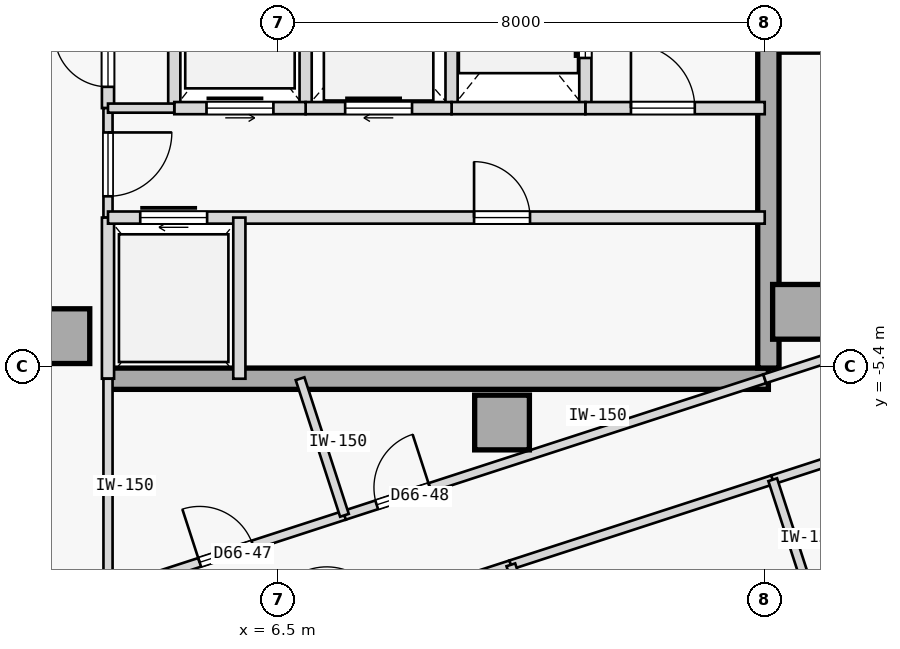
"""IFC4 building model, lengths in metres.
Left out: names, types, materials, properties, quantities, classifications, styles, units other than length and angle.
Written with IfcOpenShell. Run it as: python <this file> out.ifc"""

import sys

from ifc_helpers import new_model, si_unit, direction, frame, frame_2d, origin, origin_2d, place, context, subcontext, project, spatial, rectangle, extrude, element, fill, save


model = new_model("IFC4")
c1 = context("Model", 3, precision=1e-05, world=origin(), true_north=direction((0.0, 1.0)))
c2 = subcontext(c1, "Body", "Model", "MODEL_VIEW")
j1 = project(units=[si_unit("LENGTHUNIT", "METRE"), si_unit("PLANEANGLEUNIT", "RADIAN")], contexts=[c1])
p1 = place(None, origin())
s1 = spatial("IfcSite", under=j1, at=p1, CompositionType="ELEMENT")
p2 = place(p1, origin())
s2 = spatial("IfcBuilding", under=s1, at=p2, CompositionType="ELEMENT")
p3 = place(p2, frame((0.0, 0.0, 247.75)))
s3 = spatial("IfcBuildingStorey", under=s2, at=p3, CompositionType="ELEMENT", Elevation=247.75)
for number, where, z_axis, x_axis in (
    (1, (15.08, -4.5, 0.0), (0.0, 0.0, 1.0), (1.0, 0.0, 0.0)),
    (2, (10.18, -6.32, 0.0), (0.0, 0.0, 1.0), (1.0, 0.0, 0.0)),
    (3, (2.95, -4.9, 0.0), (0.0, 0.0, 1.0), (1.0, 0.0, 0.0)),
):
    element("IfcColumn", number, at=place(p3, frame(where, z_axis=z_axis, x_axis=x_axis)), inside=s3, PredefinedType="COLUMN", context=c2, shape_type="SweptSolid", body=[
        extrude(rectangle(XDim=0.9, YDim=0.9, at=origin_2d()), origin(), (0.0, 0.0, 1.0), 3.35),
    ])
p4 = place(p3, frame((3.7, -5.6, 0.0), z_axis=(0.0, 0.0, 1.0), x_axis=(1.0, 0.0, 0.0)))
e4 = element("IfcWall", 4, at=p4, inside=s3, PredefinedType="SHEAR", context=c2, shape_type="SweptSolid", body=[
    extrude(rectangle(XDim=10.86, YDim=0.35, at=frame_2d((5.43, 0.0))), origin(), (0.0, 0.0, 1.0), 3.125),
])
p5 = place(p3, frame((14.56, -5.425, 0.0), z_axis=(0.0, 0.0, 1.0), x_axis=(0.0, 1.0, 0.0)))
e5 = element("IfcWall", 5, at=p5, inside=s3, PredefinedType="SHEAR", context=c2, shape_type="SweptSolid", body=[
    extrude(rectangle(XDim=10.85, YDim=0.35, at=frame_2d((5.425, 0.0))), origin(), (0.0, 0.0, 1.0), 3.125),
])
p6 = place(p3, frame((3.7, -1.15, 0.0), z_axis=(0.0, 0.0, 1.0), x_axis=(0.0, 1.0, 0.0)))
e6 = element("IfcWall", 6, at=p6, inside=s3, PredefinedType="STANDARD", context=c2, shape_type="SweptSolid", body=[
    extrude(rectangle(XDim=6.75, YDim=0.2, at=frame_2d((3.375, 0.0))), origin(), (0.0, 0.0, 1.0), 3.125),
])
p7 = place(p6, frame((0.35, 0.0, 0.0)))
e7 = element("IfcOpeningElement", 7, at=p7, cuts=e6, PredefinedType="OPENING", context=c2, shape_type="SweptSolid", body=[
    extrude(rectangle(XDim=0.88, YDim=2.15, at=frame_2d((0.44, 1.075))), frame((0.0, 0.11, 0.0), z_axis=(0.0, -1.0, 0.0), x_axis=(1.0, 0.0, 0.0)), (0.0, 0.0, 1.0), 0.22),
])
p8 = place(p6, frame((2.55, 0.0, 0.0)))
e8 = element("IfcOpeningElement", 8, at=p8, cuts=e6, PredefinedType="OPENING", context=c2, shape_type="SweptSolid", body=[
    extrude(rectangle(XDim=0.92, YDim=2.15, at=frame_2d((0.46, 1.075))), frame((0.0, 0.11, 0.0), z_axis=(0.0, -1.0, 0.0), x_axis=(1.0, 0.0, 0.0)), (0.0, 0.0, 1.0), 0.22),
])
p9 = place(p6, frame((4.22, 0.0, 0.0)))
e9 = element("IfcOpeningElement", 9, at=p9, cuts=e6, PredefinedType="OPENING", context=c2, shape_type="SweptSolid", body=[
    extrude(rectangle(XDim=0.88, YDim=2.15, at=frame_2d((0.44, 1.075))), frame((0.0, 0.11, 0.0), z_axis=(0.0, -1.0, 0.0), x_axis=(1.0, 0.0, 0.0)), (0.0, 0.0, 1.0), 0.22),
])
p10 = place(p3, frame((3.7, -2.95, 0.0), z_axis=(0.0, 0.0, 1.0), x_axis=(0.0, 1.0, 0.0)))
e10 = element("IfcWall", 10, at=p10, inside=s3, PredefinedType="PARTITIONING", context=c2, shape_type="SweptSolid", body=[
    extrude(rectangle(XDim=1.8, YDim=0.15, at=frame_2d((0.9, 0.0))), origin(), (0.0, 0.0, 1.0), 3.125),
])
p11 = place(p10, frame((0.35, 0.0, 0.0)))
e11 = element("IfcOpeningElement", 11, at=p11, cuts=e10, PredefinedType="OPENING", context=c2, shape_type="SweptSolid", body=[
    extrude(rectangle(XDim=1.05, YDim=2.18, at=frame_2d((0.525, 1.09))), frame((0.0, 0.085, 0.0), z_axis=(0.0, -1.0, 0.0), x_axis=(1.0, 0.0, 0.0)), (0.0, 0.0, 1.0), 0.17),
])
p12 = place(p3, frame((3.7, -5.6, 0.0), z_axis=(0.0, 0.0, 1.0), x_axis=(0.0, 1.0, 0.0)))
e12 = element("IfcWall", 12, at=p12, inside=s3, PredefinedType="STANDARD", context=c2, shape_type="SweptSolid", body=[
    extrude(rectangle(XDim=2.65, YDim=0.2, at=frame_2d((1.325, 0.0))), origin(), (0.0, 0.0, 1.0), 3.125),
])
p13 = place(p3, frame((11.55, -1.15, 0.0), z_axis=(0.0, 0.0, 1.0), x_axis=(0.0, 1.0, 0.0)))
e13 = element("IfcWall", 13, at=p13, inside=s3, PredefinedType="STANDARD", context=c2, shape_type="SweptSolid", body=[
    extrude(rectangle(XDim=2.75, YDim=0.2, at=frame_2d((1.375, 0.0))), origin(), (0.0, 0.0, 1.0), 3.125),
])
p14 = place(p13, frame((0.825, 0.0, 0.0)))
e14 = element("IfcOpeningElement", 14, at=p14, cuts=e13, PredefinedType="OPENING", context=c2, shape_type="SweptSolid", body=[
    extrude(rectangle(XDim=1.1, YDim=2.15, at=frame_2d((0.55, 1.075))), frame((0.0, 0.11, 0.0), z_axis=(0.0, -1.0, 0.0), x_axis=(1.0, 0.0, 0.0)), (0.0, 0.0, 1.0), 0.22),
])
p15 = place(p3, frame((9.35, -1.15, 0.0), z_axis=(0.0, 0.0, 1.0), x_axis=(0.0, 1.0, 0.0)))
e15 = element("IfcWall", 15, at=p15, inside=s3, PredefinedType="STANDARD", context=c2, shape_type="SweptSolid", body=[
    extrude(rectangle(XDim=2.75, YDim=0.2, at=frame_2d((1.375, 0.0))), origin(), (0.0, 0.0, 1.0), 3.125),
])
p16 = place(p3, frame((11.55, -1.15, 0.0), z_axis=(0.0, 0.0, 1.0), x_axis=(1.0, 0.0, 0.0)))
e16 = element("IfcWall", 16, at=p16, inside=s3, PredefinedType="STANDARD", context=c2, shape_type="SweptSolid", body=[
    extrude(rectangle(XDim=2.95, YDim=0.2, at=frame_2d((1.475, 0.0))), origin(), (0.0, 0.0, 1.0), 3.125),
])
p17 = place(p16, frame((0.75, 0.0, 0.0)))
e17 = element("IfcOpeningElement", 17, at=p17, cuts=e16, PredefinedType="OPENING", context=c2, shape_type="SweptSolid", body=[
    extrude(rectangle(XDim=1.05, YDim=2.18, at=frame_2d((0.525, 1.09))), frame((0.0, 0.11, 0.0), z_axis=(0.0, -1.0, 0.0), x_axis=(1.0, 0.0, 0.0)), (0.0, 0.0, 1.0), 0.22),
])
p18 = place(p3, frame((9.35, -1.15, 0.0), z_axis=(0.0, 0.0, 1.0), x_axis=(1.0, 0.0, 0.0)))
e18 = element("IfcWall", 18, at=p18, inside=s3, PredefinedType="STANDARD", context=c2, shape_type="SweptSolid", body=[
    extrude(rectangle(XDim=2.2, YDim=0.2, at=frame_2d((1.1, 0.0))), origin(), (0.0, 0.0, 1.0), 3.125),
])
p19 = place(p3, frame((6.95, -1.15, 0.0), z_axis=(0.0, 0.0, 1.0), x_axis=(0.0, 1.0, 0.0)))
e19 = element("IfcWall", 19, at=p19, inside=s3, PredefinedType="STANDARD", context=c2, shape_type="SweptSolid", body=[
    extrude(rectangle(XDim=2.75, YDim=0.2, at=frame_2d((1.375, 0.0))), origin(), (0.0, 0.0, 1.0), 3.125),
])
p20 = place(p3, frame((6.95, -1.15, 0.0), z_axis=(0.0, 0.0, 1.0), x_axis=(1.0, 0.0, 0.0)))
e20 = element("IfcWall", 20, at=p20, inside=s3, PredefinedType="STANDARD", context=c2, shape_type="SweptSolid", body=[
    extrude(rectangle(XDim=2.4, YDim=0.2, at=frame_2d((1.2, 0.0))), origin(), (0.0, 0.0, 1.0), 3.125),
])
p21 = place(p20, frame((0.65, 0.0, 0.0)))
e21 = element("IfcOpeningElement", 21, at=p21, cuts=e20, PredefinedType="OPENING", context=c2, shape_type="SweptSolid", body=[
    extrude(rectangle(XDim=1.1, YDim=2.15, at=frame_2d((0.55, 1.075))), frame((0.0, 0.11, 0.0), z_axis=(0.0, -1.0, 0.0), x_axis=(1.0, 0.0, 0.0)), (0.0, 0.0, 1.0), 0.22),
])
p22 = place(p3, frame((4.79, -1.15, 0.0), z_axis=(0.0, 0.0, 1.0), x_axis=(0.0, 1.0, 0.0)))
e22 = element("IfcWall", 22, at=p22, inside=s3, PredefinedType="STANDARD", context=c2, shape_type="SweptSolid", body=[
    extrude(rectangle(XDim=2.75, YDim=0.2, at=frame_2d((1.375, 0.0))), origin(), (0.0, 0.0, 1.0), 3.125),
])
p23 = place(p3, frame((4.79, -1.15, 0.0), z_axis=(0.0, 0.0, 1.0), x_axis=(1.0, 0.0, 0.0)))
e23 = element("IfcWall", 23, at=p23, inside=s3, PredefinedType="STANDARD", context=c2, shape_type="SweptSolid", body=[
    extrude(rectangle(XDim=2.16, YDim=0.2, at=frame_2d((1.08, 0.0))), origin(), (0.0, 0.0, 1.0), 3.125),
])
p24 = place(p23, frame((0.53, 0.0, 0.0)))
e24 = element("IfcOpeningElement", 24, at=p24, cuts=e23, PredefinedType="OPENING", context=c2, shape_type="SweptSolid", body=[
    extrude(rectangle(XDim=1.1, YDim=2.15, at=frame_2d((0.55, 1.075))), frame((0.0, 0.11, 0.0), z_axis=(0.0, -1.0, 0.0), x_axis=(1.0, 0.0, 0.0)), (0.0, 0.0, 1.0), 0.22),
])
p25 = place(p3, frame((3.7, -1.15, 0.0), z_axis=(0.0, 0.0, 1.0), x_axis=(1.0, 0.0, 0.0)))
e25 = element("IfcWall", 25, at=p25, inside=s3, PredefinedType="PARTITIONING", context=c2, shape_type="SweptSolid", body=[
    extrude(rectangle(XDim=1.09, YDim=0.15, at=frame_2d((0.545, 0.0))), origin(), (0.0, 0.0, 1.0), 3.125),
])
p26 = place(p3, frame((3.7, -2.95, 0.0), z_axis=(0.0, 0.0, 1.0), x_axis=(1.0, 0.0, 0.0)))
e26 = element("IfcWall", 26, at=p26, inside=s3, PredefinedType="STANDARD", context=c2, shape_type="SweptSolid", body=[
    extrude(rectangle(XDim=10.8, YDim=0.2, at=frame_2d((5.4, 0.0))), origin(), (0.0, 0.0, 1.0), 3.125),
])
p27 = place(p26, frame((0.53, 0.0, 0.0)))
e27 = element("IfcOpeningElement", 27, at=p27, cuts=e26, PredefinedType="OPENING", context=c2, shape_type="SweptSolid", body=[
    extrude(rectangle(XDim=1.1, YDim=2.15, at=frame_2d((0.55, 1.075))), frame((0.0, 0.11, 0.0), z_axis=(0.0, -1.0, 0.0), x_axis=(1.0, 0.0, 0.0)), (0.0, 0.0, 1.0), 0.22),
])
p28 = place(p26, frame((6.02, 0.0, 0.0)))
e28 = element("IfcOpeningElement", 28, at=p28, cuts=e26, PredefinedType="OPENING", context=c2, shape_type="SweptSolid", body=[
    extrude(rectangle(XDim=0.92, YDim=2.15, at=frame_2d((0.46, 1.075))), frame((0.0, 0.11, 0.0), z_axis=(0.0, -1.0, 0.0), x_axis=(1.0, 0.0, 0.0)), (0.0, 0.0, 1.0), 0.22),
])
p29 = place(p3, frame((5.86, -5.6, 0.0), z_axis=(0.0, 0.0, 1.0), x_axis=(0.0, 1.0, 0.0)))
e29 = element("IfcWall", 29, at=p29, inside=s3, PredefinedType="STANDARD", context=c2, shape_type="SweptSolid", body=[
    extrude(rectangle(XDim=2.65, YDim=0.2, at=frame_2d((1.325, 0.0))), origin(), (0.0, 0.0, 1.0), 3.125),
])
p30 = place(p3, frame((5.174, -10.334, 0.0), z_axis=(0.0, 0.0, 1.0), x_axis=(0.951058579685, 0.30901064384, 0.0)))
e30 = element("IfcWall", 30, at=p30, inside=s3, PredefinedType="PARTITIONING", context=c2, shape_type="SweptSolid", body=[
    extrude(rectangle(XDim=5.416, YDim=0.15, at=frame_2d((2.708, 0.0))), origin(), (0.0, 0.0, 1.0), 3.125),
])
p31 = place(p30, frame((2.233, 0.0, 0.0)))
e31 = element("IfcOpeningElement", 31, at=p31, cuts=e30, PredefinedType="OPENING", context=c2, shape_type="SweptSolid", body=[
    extrude(rectangle(XDim=0.95, YDim=2.15, at=frame_2d((0.475, 1.075))), frame((0.0, 0.085, 0.0), z_axis=(0.0, -1.0, 0.0), x_axis=(1.0, 0.0, 0.0)), (0.0, 0.0, 1.0), 0.17),
])
p32 = place(p3, frame((10.325, -8.66, 0.0), z_axis=(0.0, 0.0, 1.0), x_axis=(0.95106061278, 0.309004386407, 0.0)))
e32 = element("IfcWall", 32, at=p32, inside=s3, PredefinedType="PARTITIONING", context=c2, shape_type="SweptSolid", body=[
    extrude(rectangle(XDim=4.528, YDim=0.15, at=frame_2d((2.264, 0.0))), origin(), (0.0, 0.0, 1.0), 3.125),
])
p33 = place(p3, frame((14.631, -7.261, 0.0), z_axis=(0.0, 0.0, 1.0), x_axis=(0.951066131077, 0.308987401554, 0.0)))
e33 = element("IfcWall", 33, at=p33, inside=s3, PredefinedType="PARTITIONING", context=c2, shape_type="SweptSolid", body=[
    extrude(rectangle(XDim=2.35, YDim=0.15, at=frame_2d((1.175, 0.0))), origin(), (0.0, 0.0, 1.0), 3.125),
])
p34 = place(p3, frame((3.7, -9.109, 0.0), z_axis=(0.0, 0.0, 1.0), x_axis=(-0.000139130433, 0.999999990321, 0.0)))
e34 = element("IfcWall", 34, at=p34, inside=s3, PredefinedType="PARTITIONING", context=c2, shape_type="SweptSolid", body=[
    extrude(rectangle(XDim=3.51, YDim=0.15, at=frame_2d((1.755, 0.0))), origin(), (0.0, 0.0, 1.0), 3.125),
])
p35 = place(p3, frame((3.7, -9.109, 0.0), z_axis=(0.0, 0.0, 1.0), x_axis=(0.95106259184, 0.308998295145, 0.0)))
e35 = element("IfcWall", 35, at=p35, inside=s3, PredefinedType="PARTITIONING", context=c2, shape_type="SweptSolid", body=[
    extrude(rectangle(XDim=4.088, YDim=0.15, at=frame_2d((2.044, 0.0))), origin(), (0.0, 0.0, 1.0), 3.125),
])
p36 = place(p35, frame((1.584, 0.0, 0.0)))
e36 = element("IfcOpeningElement", 36, at=p36, cuts=e35, PredefinedType="OPENING", context=c2, shape_type="SweptSolid", body=[
    extrude(rectangle(XDim=0.92, YDim=2.15, at=frame_2d((0.46, 1.075))), frame((0.0, 0.085, 0.0), z_axis=(0.0, -1.0, 0.0), x_axis=(1.0, 0.0, 0.0)), (0.0, 0.0, 1.0), 0.17),
])
p37 = place(p3, frame((7.588, -7.846, 0.0), z_axis=(0.0, 0.0, 1.0), x_axis=(0.951058013903, 0.309012385174, 0.0)))
e37 = element("IfcWall", 37, at=p37, inside=s3, PredefinedType="PARTITIONING", context=c2, shape_type="SweptSolid", body=[
    extrude(rectangle(XDim=7.267, YDim=0.15, at=frame_2d((3.634, 0.0))), origin(), (0.0, 0.0, 1.0), 3.125),
])
p38 = place(p37, frame((0.557, 0.0, 0.0)))
e38 = element("IfcOpeningElement", 38, at=p38, cuts=e37, PredefinedType="OPENING", context=c2, shape_type="SweptSolid", body=[
    extrude(rectangle(XDim=0.92, YDim=2.15, at=frame_2d((0.46, 1.075))), frame((0.0, 0.085, 0.0), z_axis=(0.0, -1.0, 0.0), x_axis=(1.0, 0.0, 0.0)), (0.0, 0.0, 1.0), 0.17),
])
p39 = place(p3, frame((14.5, -5.6, 0.0), z_axis=(0.0, 0.0, 1.0), x_axis=(0.951047546178, 0.309044600193, 0.0)))
e39 = element("IfcWall", 39, at=p39, inside=s3, PredefinedType="PARTITIONING", context=c2, shape_type="SweptSolid", body=[
    extrude(rectangle(XDim=3.461, YDim=0.15, at=frame_2d((1.73, 0.0))), origin(), (0.0, 0.0, 1.0), 3.125),
])
p40 = place(p39, frame((1.79, 0.0, 0.0)))
e40 = element("IfcOpeningElement", 40, at=p40, cuts=e39, PredefinedType="OPENING", context=c2, shape_type="SweptSolid", body=[
    extrude(rectangle(XDim=0.92, YDim=2.15, at=frame_2d((0.46, 1.075))), frame((0.0, 0.085, 0.0), z_axis=(0.0, -1.0, 0.0), x_axis=(1.0, 0.0, 0.0)), (0.0, 0.0, 1.0), 0.17),
])
p41 = place(p3, frame((13.372, -18.04, 0.0), z_axis=(0.0, 0.0, 1.0), x_axis=(-0.308999867152, 0.951062081097, 0.0)))
e41 = element("IfcWall", 41, at=p41, inside=s3, PredefinedType="PARTITIONING", context=c2, shape_type="SweptSolid", body=[
    extrude(rectangle(XDim=9.862, YDim=0.15, at=frame_2d((4.931, 0.0))), origin(), (0.0, 0.0, 1.0), 3.125),
])
p42 = place(p3, frame((15.311, -9.353, 0.0), z_axis=(0.0, 0.0, 1.0), x_axis=(-0.308960600764, 0.951074837842, 0.0)))
e42 = element("IfcWall", 42, at=p42, inside=s3, PredefinedType="PARTITIONING", context=c2, shape_type="SweptSolid", body=[
    extrude(rectangle(XDim=2.2, YDim=0.15, at=frame_2d((1.1, 0.0))), origin(), (0.0, 0.0, 1.0), 3.125),
])
p43 = place(p3, frame((15.311, -9.353, 0.0), z_axis=(0.0, 0.0, 1.0), x_axis=(0.951076048914, 0.308956872689, 0.0)))
e43 = element("IfcWall", 43, at=p43, inside=s3, PredefinedType="PARTITIONING", context=c2, shape_type="SweptSolid", body=[
    extrude(rectangle(XDim=2.35, YDim=0.15, at=frame_2d((1.175, 0.0))), origin(), (0.0, 0.0, 1.0), 3.125),
])
p44 = place(p43, frame((0.735, 0.0, 0.0)))
e44 = element("IfcOpeningElement", 44, at=p44, cuts=e43, PredefinedType="OPENING", context=c2, shape_type="SweptSolid", body=[
    extrude(rectangle(XDim=0.88, YDim=2.15, at=frame_2d((0.44, 1.075))), frame((0.0, 0.085, 0.0), z_axis=(0.0, -1.0, 0.0), x_axis=(1.0, 0.0, 0.0)), (0.0, 0.0, 1.0), 0.17),
])
p45 = place(p3, frame((7.588, -7.846, 0.0), z_axis=(0.0, 0.0, 1.0), x_axis=(-0.309055688452, 0.951043942957, 0.0)))
e45 = element("IfcWall", 45, at=p45, inside=s3, PredefinedType="PARTITIONING", context=c2, shape_type="SweptSolid", body=[
    extrude(rectangle(XDim=2.362, YDim=0.15, at=frame_2d((1.181, 0.0))), origin(), (0.0, 0.0, 1.0), 3.125),
])
p46 = place(p17, origin())
e46 = element("IfcDoor", 46, at=p46, inside=s3, OperationType="SINGLE_SWING_LEFT", PredefinedType="DOOR", context=c2, shape_type="SweptSolid", body=[
    extrude(rectangle(XDim=1.05, YDim=2.18, at=frame_2d((0.525, 1.09))), frame((0.0, 0.025, 0.0), z_axis=(0.0, -1.0, 0.0), x_axis=(1.0, 0.0, 0.0)), (0.0, 0.0, 1.0), 0.05),
])
fill(e17, e46)
p47 = place(p11, frame((1.05, 0.0, 0.0), z_axis=(0.0, 0.0, 1.0), x_axis=(-1.0, 0.0, 0.0)))
e47 = element("IfcDoor", 47, at=p47, inside=s3, OperationType="SINGLE_SWING_RIGHT", PredefinedType="DOOR", context=c2, shape_type="SweptSolid", body=[
    extrude(rectangle(XDim=1.05, YDim=2.18, at=frame_2d((0.525, 1.09))), frame((0.0, 0.025, 0.0), z_axis=(0.0, -1.0, 0.0), x_axis=(1.0, 0.0, 0.0)), (0.0, 0.0, 1.0), 0.05),
])
fill(e11, e47)
p48 = place(p14, origin())
e48 = element("IfcDoor", 48, at=p48, inside=s3, OperationType="SLIDING_TO_RIGHT", PredefinedType="DOOR", context=c2, shape_type="SweptSolid", body=[
    extrude(rectangle(XDim=1.1, YDim=2.15, at=frame_2d((0.55, 1.075))), frame((0.0, 0.025, 0.0), z_axis=(0.0, -1.0, 0.0), x_axis=(1.0, 0.0, 0.0)), (0.0, 0.0, 1.0), 0.05),
])
fill(e14, e48)
p49 = place(p21, origin())
e49 = element("IfcDoor", 49, at=p49, inside=s3, OperationType="SLIDING_TO_RIGHT", PredefinedType="DOOR", context=c2, shape_type="SweptSolid", body=[
    extrude(rectangle(XDim=1.1, YDim=2.15, at=frame_2d((0.55, 1.075))), frame((0.0, 0.025, 0.0), z_axis=(0.0, -1.0, 0.0), x_axis=(1.0, 0.0, 0.0)), (0.0, 0.0, 1.0), 0.05),
])
fill(e21, e49)
p50 = place(p24, origin())
e50 = element("IfcDoor", 50, at=p50, inside=s3, OperationType="SLIDING_TO_LEFT", PredefinedType="DOOR", context=c2, shape_type="SweptSolid", body=[
    extrude(rectangle(XDim=1.1, YDim=2.15, at=frame_2d((0.55, 1.075))), frame((0.0, 0.025, 0.0), z_axis=(0.0, -1.0, 0.0), x_axis=(1.0, 0.0, 0.0)), (0.0, 0.0, 1.0), 0.05),
])
fill(e24, e50)
p51 = place(p27, origin())
e51 = element("IfcDoor", 51, at=p51, inside=s3, OperationType="SLIDING_TO_RIGHT", PredefinedType="DOOR", context=c2, shape_type="SweptSolid", body=[
    extrude(rectangle(XDim=1.1, YDim=2.15, at=frame_2d((0.55, 1.075))), frame((0.0, 0.025, 0.0), z_axis=(0.0, -1.0, 0.0), x_axis=(1.0, 0.0, 0.0)), (0.0, 0.0, 1.0), 0.05),
])
fill(e27, e51)
p52 = place(p28, origin())
e52 = element("IfcDoor", 52, at=p52, inside=s3, OperationType="SINGLE_SWING_LEFT", PredefinedType="DOOR", context=c2, shape_type="SweptSolid", body=[
    extrude(rectangle(XDim=0.92, YDim=2.15, at=frame_2d((0.46, 1.075))), frame((0.0, 0.025, 0.0), z_axis=(0.0, -1.0, 0.0), x_axis=(1.0, 0.0, 0.0)), (0.0, 0.0, 1.0), 0.05),
])
fill(e28, e52)
p53 = place(p7, origin())
e53 = element("IfcDoor", 53, at=p53, inside=s3, OperationType="SINGLE_SWING_RIGHT", PredefinedType="DOOR", context=c2, shape_type="SweptSolid", body=[
    extrude(rectangle(XDim=0.88, YDim=2.15, at=frame_2d((0.44, 1.075))), frame((0.0, 0.025, 0.0), z_axis=(0.0, -1.0, 0.0), x_axis=(1.0, 0.0, 0.0)), (0.0, 0.0, 1.0), 0.05),
])
fill(e7, e53)
p54 = place(p36, origin())
e54 = element("IfcDoor", 54, at=p54, inside=s3, OperationType="SINGLE_SWING_LEFT", PredefinedType="DOOR", context=c2, shape_type="SweptSolid", body=[
    extrude(rectangle(XDim=0.92, YDim=2.15, at=frame_2d((0.46, 1.075))), frame((0.0, 0.025, 0.0), z_axis=(0.0, -1.0, 0.0), x_axis=(1.0, 0.0, 0.0)), (0.0, 0.0, 1.0), 0.05),
])
fill(e36, e54)
p55 = place(p38, origin())
e55 = element("IfcDoor", 55, at=p55, inside=s3, OperationType="SINGLE_SWING_RIGHT", PredefinedType="DOOR", context=c2, shape_type="SweptSolid", body=[
    extrude(rectangle(XDim=0.92, YDim=2.15, at=frame_2d((0.46, 1.075))), frame((0.0, 0.025, 0.0), z_axis=(0.0, -1.0, 0.0), x_axis=(1.0, 0.0, 0.0)), (0.0, 0.0, 1.0), 0.05),
])
fill(e38, e55)
save(model, sys.argv[1])
